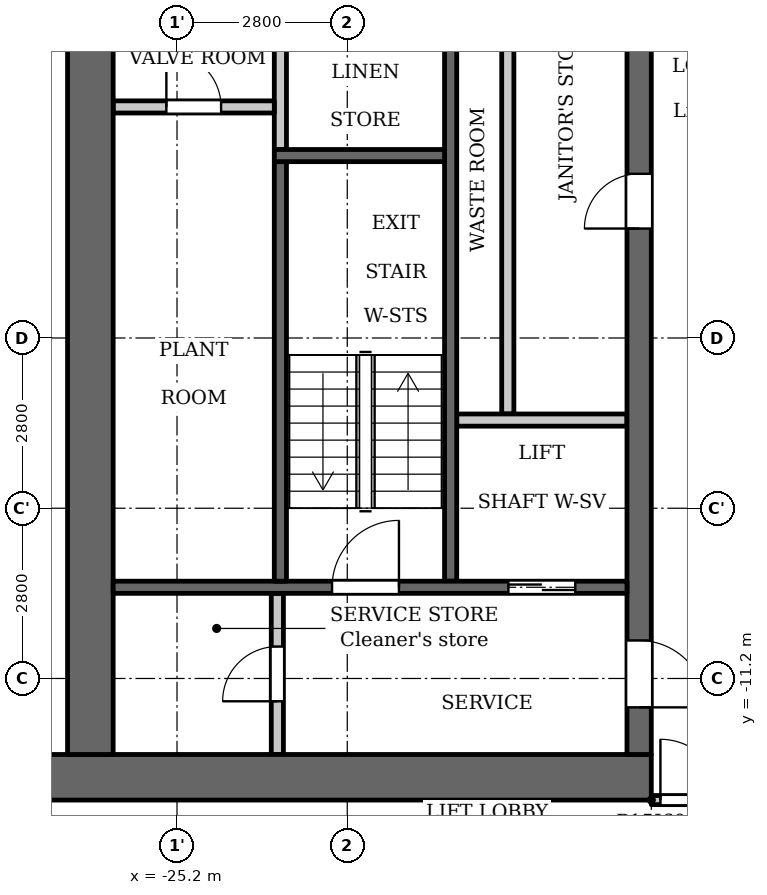
"""IFC4 building model, lengths in metres.
Left out: names, types, materials, properties, quantities, classifications, styles, units other than length and angle.
Written with IfcOpenShell. Run it as: python <this file> out.ifc"""

import sys

from ifc_helpers import new_model, si_unit, direction, frame, frame_2d, origin, place, context, subcontext, project, spatial, rectangle, extrude, element, fill, save


model = new_model("IFC4")
c1 = context("Model", 3, precision=1e-05, world=origin(), true_north=direction((0.0, 1.0)))
c2 = subcontext(c1, "Body", "Model", "MODEL_VIEW")
j1 = project(units=[si_unit("LENGTHUNIT", "METRE"), si_unit("PLANEANGLEUNIT", "RADIAN")], contexts=[c1])
p1 = place(None, origin())
s1 = spatial("IfcSite", under=j1, at=p1, CompositionType="ELEMENT")
p2 = place(p1, origin())
s2 = spatial("IfcBuilding", under=s1, at=p2, CompositionType="ELEMENT")
p3 = place(p2, frame((0.0, 0.0, 174.6)))
s3 = spatial("IfcBuildingStorey", under=s2, at=p3, CompositionType="ELEMENT", Elevation=174.6)
p4 = place(p3, frame((-23.5, -2.5, 0.0), z_axis=(0.0, 0.0, 1.0), x_axis=(0.0, 1.0, 0.0)))
e1 = element("IfcWall", 1, at=p4, inside=s3, PredefinedType="PARTITIONING", context=c2, shape_type="SweptSolid", body=[
    extrude(rectangle(XDim=2.65, YDim=0.2, at=frame_2d((1.325, 0.0))), origin(), (0.0, 0.0, 1.0), 3.15),
])
p5 = place(p3, frame((-20.7, -9.6, 0.0), z_axis=(0.0, 0.0, 1.0), x_axis=(0.0, 1.0, 0.0)))
e2 = element("IfcWall", 2, at=p5, inside=s3, PredefinedType="SHEAR", context=c2, shape_type="SweptSolid", body=[
    extrude(rectangle(XDim=9.75, YDim=0.2, at=frame_2d((4.875, 0.0))), origin(), (0.0, 0.0, 1.0), 3.15),
])
p6 = place(p3, frame((-17.4, -12.825, 0.0), z_axis=(0.0, 0.0, 1.0), x_axis=(-1.0, 0.0, 0.0)))
e3 = element("IfcWall", 3, at=p6, inside=s3, PredefinedType="SHEAR", context=c2, shape_type="SweptSolid", body=[
    extrude(rectangle(XDim=10.4, YDim=0.75, at=frame_2d((5.2, 0.0))), origin(), (0.0, 0.0, 1.0), 3.15),
])
p7 = place(p3, frame((-19.76, -6.85, 0.0), z_axis=(0.0, 0.0, 1.0), x_axis=(0.0, 1.0, 0.0)))
e4 = element("IfcWall", 4, at=p7, inside=s3, PredefinedType="PARTITIONING", context=c2, shape_type="SweptSolid", body=[
    extrude(rectangle(XDim=7.0, YDim=0.2, at=frame_2d((3.5, 0.0))), origin(), (0.0, 0.0, 1.0), 3.15),
])
p8 = place(p3, frame((-17.6, -12.45, 0.0), z_axis=(0.0, 0.0, 1.0), x_axis=(0.0, 1.0, 0.0)))
e5 = element("IfcWall", 5, at=p8, inside=s3, PredefinedType="SHEAR", context=c2, shape_type="SweptSolid", body=[
    extrude(rectangle(XDim=24.9, YDim=0.4, at=frame_2d((12.45, 0.0))), origin(), (0.0, 0.0, 1.0), 3.15),
])
p9 = place(p8, frame((8.65, 0.0, 0.0)))
e6 = element("IfcOpeningElement", 6, at=p9, cuts=e5, PredefinedType="OPENING", context=c2, shape_type="SweptSolid", body=[
    extrude(rectangle(XDim=0.9, YDim=2.1, at=frame_2d((0.45, 1.05))), frame((0.0, 0.21, 0.0), z_axis=(0.0, -1.0, 0.0), x_axis=(1.0, 0.0, 0.0)), (0.0, 0.0, 1.0), 0.42),
])
p10 = place(p8, frame((15.6, 0.0, 0.0)))
e7 = element("IfcOpeningElement", 7, at=p10, cuts=e5, PredefinedType="OPENING", context=c2, shape_type="SweptSolid", body=[
    extrude(rectangle(XDim=1.1, YDim=2.1, at=frame_2d((0.55, 1.05))), frame((0.0, 0.21, 0.0), z_axis=(0.0, -1.0, 0.0), x_axis=(1.0, 0.0, 0.0)), (0.0, 0.0, 1.0), 0.42),
])
p11 = place(p8, frame((18.0, 0.0, 0.0)))
e8 = element("IfcOpeningElement", 8, at=p11, cuts=e5, PredefinedType="OPENING", context=c2, shape_type="SweptSolid", body=[
    extrude(rectangle(XDim=1.1, YDim=2.1, at=frame_2d((0.55, 1.05))), frame((0.0, 0.21, 0.0), z_axis=(0.0, -1.0, 0.0), x_axis=(1.0, 0.0, 0.0)), (0.0, 0.0, 1.0), 0.42),
])
p12 = place(p8, frame((23.025, 0.0, 0.0)))
e9 = element("IfcOpeningElement", 9, at=p12, cuts=e5, PredefinedType="OPENING", context=c2, shape_type="SweptSolid", body=[
    extrude(rectangle(XDim=1.1, YDim=2.1, at=frame_2d((0.55, 1.05))), frame((0.0, 0.21, 0.0), z_axis=(0.0, -1.0, 0.0), x_axis=(1.0, 0.0, 0.0)), (0.0, 0.0, 1.0), 0.42),
])
p13 = place(p8, frame((0.775, 0.0, 0.0)))
e10 = element("IfcOpeningElement", 10, at=p13, cuts=e5, PredefinedType="OPENING", context=c2, shape_type="SweptSolid", body=[
    extrude(rectangle(XDim=1.1, YDim=2.1, at=frame_2d((0.55, 1.05))), frame((0.0, 0.21, 0.0), z_axis=(0.0, -1.0, 0.0), x_axis=(1.0, 0.0, 0.0)), (0.0, 0.0, 1.0), 0.42),
])
p14 = place(p8, frame((12.925, 0.0, 0.0)))
e11 = element("IfcOpeningElement", 11, at=p14, cuts=e5, PredefinedType="OPENING", context=c2, shape_type="SweptSolid", body=[
    extrude(rectangle(XDim=1.8, YDim=2.1, at=frame_2d((0.9, 1.05))), frame((0.0, 0.21, 0.0), z_axis=(0.0, -1.0, 0.0), x_axis=(1.0, 0.0, 0.0)), (0.0, 0.0, 1.0), 0.42),
])
p15 = place(p3, frame((-26.625, -12.45, 0.0), z_axis=(0.0, 0.0, 1.0), x_axis=(0.0, 1.0, 0.0)))
e12 = element("IfcWall", 12, at=p15, inside=s3, PredefinedType="SHEAR", context=c2, shape_type="SweptSolid", body=[
    extrude(rectangle(XDim=24.9, YDim=0.75, at=frame_2d((12.45, 0.0))), origin(), (0.0, 0.0, 1.0), 3.15),
])
p16 = place(p3, frame((-23.55, -12.45, 0.0), z_axis=(0.0, 0.0, 1.0), x_axis=(0.0, 1.0, 0.0)))
e13 = element("IfcWall", 13, at=p16, inside=s3, PredefinedType="PARTITIONING", context=c2, shape_type="SweptSolid", body=[
    extrude(rectangle(XDim=2.65, YDim=0.2, at=frame_2d((1.325, 0.0))), origin(), (0.0, 0.0, 1.0), 3.15),
])
p17 = place(p16, frame((0.875, 0.0, 0.0)))
e14 = element("IfcOpeningElement", 14, at=p17, cuts=e13, PredefinedType="OPENING", context=c2, shape_type="SweptSolid", body=[
    extrude(rectangle(XDim=0.9, YDim=2.1, at=frame_2d((0.45, 1.05))), frame((0.0, 0.11, 0.0), z_axis=(0.0, -1.0, 0.0), x_axis=(1.0, 0.0, 0.0)), (0.0, 0.0, 1.0), 0.22),
])
p18 = place(p3, frame((-23.6, -1.8, 0.0), z_axis=(0.0, 0.0, 1.0), x_axis=(-1.0, 0.0, 0.0)))
e15 = element("IfcWall", 15, at=p18, inside=s3, PredefinedType="PARTITIONING", context=c2, shape_type="SweptSolid", body=[
    extrude(rectangle(XDim=2.65, YDim=0.2, at=frame_2d((1.325, 0.0))), origin(), (0.0, 0.0, 1.0), 3.15),
])
p19 = place(p18, frame((0.875, 0.0, 0.0)))
e16 = element("IfcOpeningElement", 16, at=p19, cuts=e15, PredefinedType="OPENING", context=c2, shape_type="SweptSolid", body=[
    extrude(rectangle(XDim=0.9, YDim=2.1, at=frame_2d((0.45, 1.05))), frame((0.0, 0.11, 0.0), z_axis=(0.0, -1.0, 0.0), x_axis=(1.0, 0.0, 0.0)), (0.0, 0.0, 1.0), 0.22),
])
p20 = place(p3, frame((-17.8, -9.7, 0.0), z_axis=(0.0, 0.0, 1.0), x_axis=(-1.0, 0.0, 0.0)))
e17 = element("IfcWall", 17, at=p20, inside=s3, PredefinedType="SHEAR", context=c2, shape_type="SweptSolid", body=[
    extrude(rectangle(XDim=8.45, YDim=0.2, at=frame_2d((4.225, 0.0))), origin(), (0.0, 0.0, 1.0), 3.15),
])
p21 = place(p20, frame((0.85, 0.0, 0.0)))
e18 = element("IfcOpeningElement", 18, at=p21, cuts=e17, PredefinedType="OPENING", context=c2, shape_type="SweptSolid", body=[
    extrude(rectangle(XDim=1.1, YDim=2.1, at=frame_2d((0.55, 1.05))), frame((0.0, 0.11, 0.0), z_axis=(0.0, -1.0, 0.0), x_axis=(1.0, 0.0, 0.0)), (0.0, 0.0, 1.0), 0.22),
])
p22 = place(p20, frame((3.75, 0.0, 0.0)))
e19 = element("IfcOpeningElement", 19, at=p22, cuts=e17, PredefinedType="OPENING", context=c2, shape_type="SweptSolid", body=[
    extrude(rectangle(XDim=1.1, YDim=2.1, at=frame_2d((0.55, 1.05))), frame((0.0, 0.11, 0.0), z_axis=(0.0, -1.0, 0.0), x_axis=(1.0, 0.0, 0.0)), (0.0, 0.0, 1.0), 0.22),
])
p23 = place(p3, frame((-17.8, -6.95, 0.0), z_axis=(0.0, 0.0, 1.0), x_axis=(-1.0, 0.0, 0.0)))
e20 = element("IfcWall", 20, at=p23, inside=s3, PredefinedType="PARTITIONING", context=c2, shape_type="SweptSolid", body=[
    extrude(rectangle(XDim=2.8, YDim=0.2, at=frame_2d((1.4, 0.0))), origin(), (0.0, 0.0, 1.0), 3.15),
])
p24 = place(p3, frame((-23.5, -9.6, 0.0), z_axis=(0.0, 0.0, 1.0), x_axis=(0.0, 1.0, 0.0)))
e21 = element("IfcWall", 21, at=p24, inside=s3, PredefinedType="SHEAR", context=c2, shape_type="SweptSolid", body=[
    extrude(rectangle(XDim=6.9, YDim=0.2, at=frame_2d((3.45, 0.0))), origin(), (0.0, 0.0, 1.0), 3.15),
])
p25 = place(p3, frame((-20.8, -2.6, 0.0), z_axis=(0.0, 0.0, 1.0), x_axis=(-1.0, 0.0, 0.0)))
e22 = element("IfcWall", 22, at=p25, inside=s3, PredefinedType="SHEAR", context=c2, shape_type="SweptSolid", body=[
    extrude(rectangle(XDim=2.8, YDim=0.2, at=frame_2d((1.4, 0.0))), origin(), (0.0, 0.0, 1.0), 3.15),
])
p26 = place(p3, frame((-17.4, -13.2, 0.0), z_axis=(0.0, 0.0, 1.0), x_axis=(1.0, 0.0, 0.0)))
e23 = element("IfcWall", 23, at=p26, inside=s3, PredefinedType="PARTITIONING", context=c2, shape_type="SweptSolid", body=[
    extrude(rectangle(XDim=34.8, YDim=0.15, at=frame_2d((17.4, 0.0))), origin(), (0.0, 0.0, 1.0), 3.15),
])
p27 = place(p26, frame((0.15, 0.0, 0.0)))
e24 = element("IfcOpeningElement", 24, at=p27, cuts=e23, PredefinedType="OPENING", context=c2, shape_type="SweptSolid", body=[
    extrude(rectangle(XDim=1.0, YDim=2.1, at=frame_2d((0.5, 1.05))), frame((0.0, 0.085, 0.0), z_axis=(0.0, -1.0, 0.0), x_axis=(1.0, 0.0, 0.0)), (0.0, 0.0, 1.0), 0.17),
])
p28 = place(p26, frame((33.55, 0.0, 0.0)))
e25 = element("IfcOpeningElement", 25, at=p28, cuts=e23, PredefinedType="OPENING", context=c2, shape_type="SweptSolid", body=[
    extrude(rectangle(XDim=1.0, YDim=2.1, at=frame_2d((0.5, 1.05))), frame((0.0, 0.085, 0.0), z_axis=(0.0, -1.0, 0.0), x_axis=(1.0, 0.0, 0.0)), (0.0, 0.0, 1.0), 0.17),
])
p29 = place(p26, frame((15.7, 0.0, 0.0)))
e26 = element("IfcOpeningElement", 26, at=p29, cuts=e23, PredefinedType="OPENING", context=c2, shape_type="SweptSolid", body=[
    extrude(rectangle(XDim=1.0, YDim=2.1, at=frame_2d((0.5, 1.05))), frame((0.0, 0.085, 0.0), z_axis=(0.0, -1.0, 0.0), x_axis=(1.0, 0.0, 0.0)), (0.0, 0.0, 1.0), 0.17),
])
p30 = place(p26, frame((26.9, 0.0, 0.0)))
e27 = element("IfcOpeningElement", 27, at=p30, cuts=e23, PredefinedType="OPENING", context=c2, shape_type="SweptSolid", body=[
    extrude(rectangle(XDim=1.0, YDim=2.1, at=frame_2d((0.5, 1.05))), frame((0.0, 0.085, 0.0), z_axis=(0.0, -1.0, 0.0), x_axis=(1.0, 0.0, 0.0)), (0.0, 0.0, 1.0), 0.17),
])
p31 = place(p21, origin())
e28 = element("IfcDoor", 28, at=p31, inside=s3, OperationType="DOUBLE_DOOR_SLIDING", PredefinedType="DOOR", context=c2, shape_type="SweptSolid", body=[
    extrude(rectangle(XDim=1.1, YDim=2.1, at=frame_2d((0.55, 1.05))), frame((0.0, 0.025, 0.0), z_axis=(0.0, -1.0, 0.0), x_axis=(1.0, 0.0, 0.0)), (0.0, 0.0, 1.0), 0.05),
])
fill(e18, e28)
p32 = place(p9, origin())
e29 = element("IfcDoor", 29, at=p32, inside=s3, OperationType="SINGLE_SWING_RIGHT", PredefinedType="DOOR", context=c2, shape_type="SweptSolid", body=[
    extrude(rectangle(XDim=0.9, YDim=2.1, at=frame_2d((0.45, 1.05))), frame((0.0, 0.025, 0.0), z_axis=(0.0, -1.0, 0.0), x_axis=(1.0, 0.0, 0.0)), (0.0, 0.0, 1.0), 0.05),
])
fill(e6, e29)
p33 = place(p13, origin())
e30 = element("IfcDoor", 30, at=p33, inside=s3, OperationType="SINGLE_SWING_LEFT", PredefinedType="DOOR", context=c2, shape_type="SweptSolid", body=[
    extrude(rectangle(XDim=1.1, YDim=2.1, at=frame_2d((0.55, 1.05))), frame((0.0, 0.025, 0.0), z_axis=(0.0, -1.0, 0.0), x_axis=(1.0, 0.0, 0.0)), (0.0, 0.0, 1.0), 0.05),
])
fill(e10, e30)
p34 = place(p17, origin())
e31 = element("IfcDoor", 31, at=p34, inside=s3, OperationType="SINGLE_SWING_RIGHT", PredefinedType="DOOR", context=c2, shape_type="SweptSolid", body=[
    extrude(rectangle(XDim=0.9, YDim=2.1, at=frame_2d((0.45, 1.05))), frame((0.0, 0.025, 0.0), z_axis=(0.0, -1.0, 0.0), x_axis=(1.0, 0.0, 0.0)), (0.0, 0.0, 1.0), 0.05),
])
fill(e14, e31)
p35 = place(p22, origin())
e32 = element("IfcDoor", 32, at=p35, inside=s3, OperationType="SINGLE_SWING_LEFT", PredefinedType="DOOR", context=c2, shape_type="SweptSolid", body=[
    extrude(rectangle(XDim=1.1, YDim=2.1, at=frame_2d((0.55, 1.05))), frame((0.0, 0.025, 0.0), z_axis=(0.0, -1.0, 0.0), x_axis=(1.0, 0.0, 0.0)), (0.0, 0.0, 1.0), 0.05),
])
fill(e19, e32)
p36 = place(p19, origin())
e33 = element("IfcDoor", 33, at=p36, inside=s3, OperationType="SINGLE_SWING_RIGHT", PredefinedType="DOOR", context=c2, shape_type="SweptSolid", body=[
    extrude(rectangle(XDim=0.9, YDim=2.1, at=frame_2d((0.45, 1.05))), frame((0.0, 0.025, 0.0), z_axis=(0.0, -1.0, 0.0), x_axis=(1.0, 0.0, 0.0)), (0.0, 0.0, 1.0), 0.05),
])
fill(e16, e33)
p37 = place(p27, origin())
e34 = element("IfcDoor", 34, at=p37, inside=s3, OperationType="SINGLE_SWING_RIGHT", PredefinedType="DOOR", context=c2, shape_type="SweptSolid", body=[
    extrude(rectangle(XDim=1.0, YDim=2.1, at=frame_2d((0.5, 1.05))), frame((0.0, 0.025, 0.0), z_axis=(0.0, -1.0, 0.0), x_axis=(1.0, 0.0, 0.0)), (0.0, 0.0, 1.0), 0.05),
])
fill(e24, e34)
save(model, sys.argv[1])
